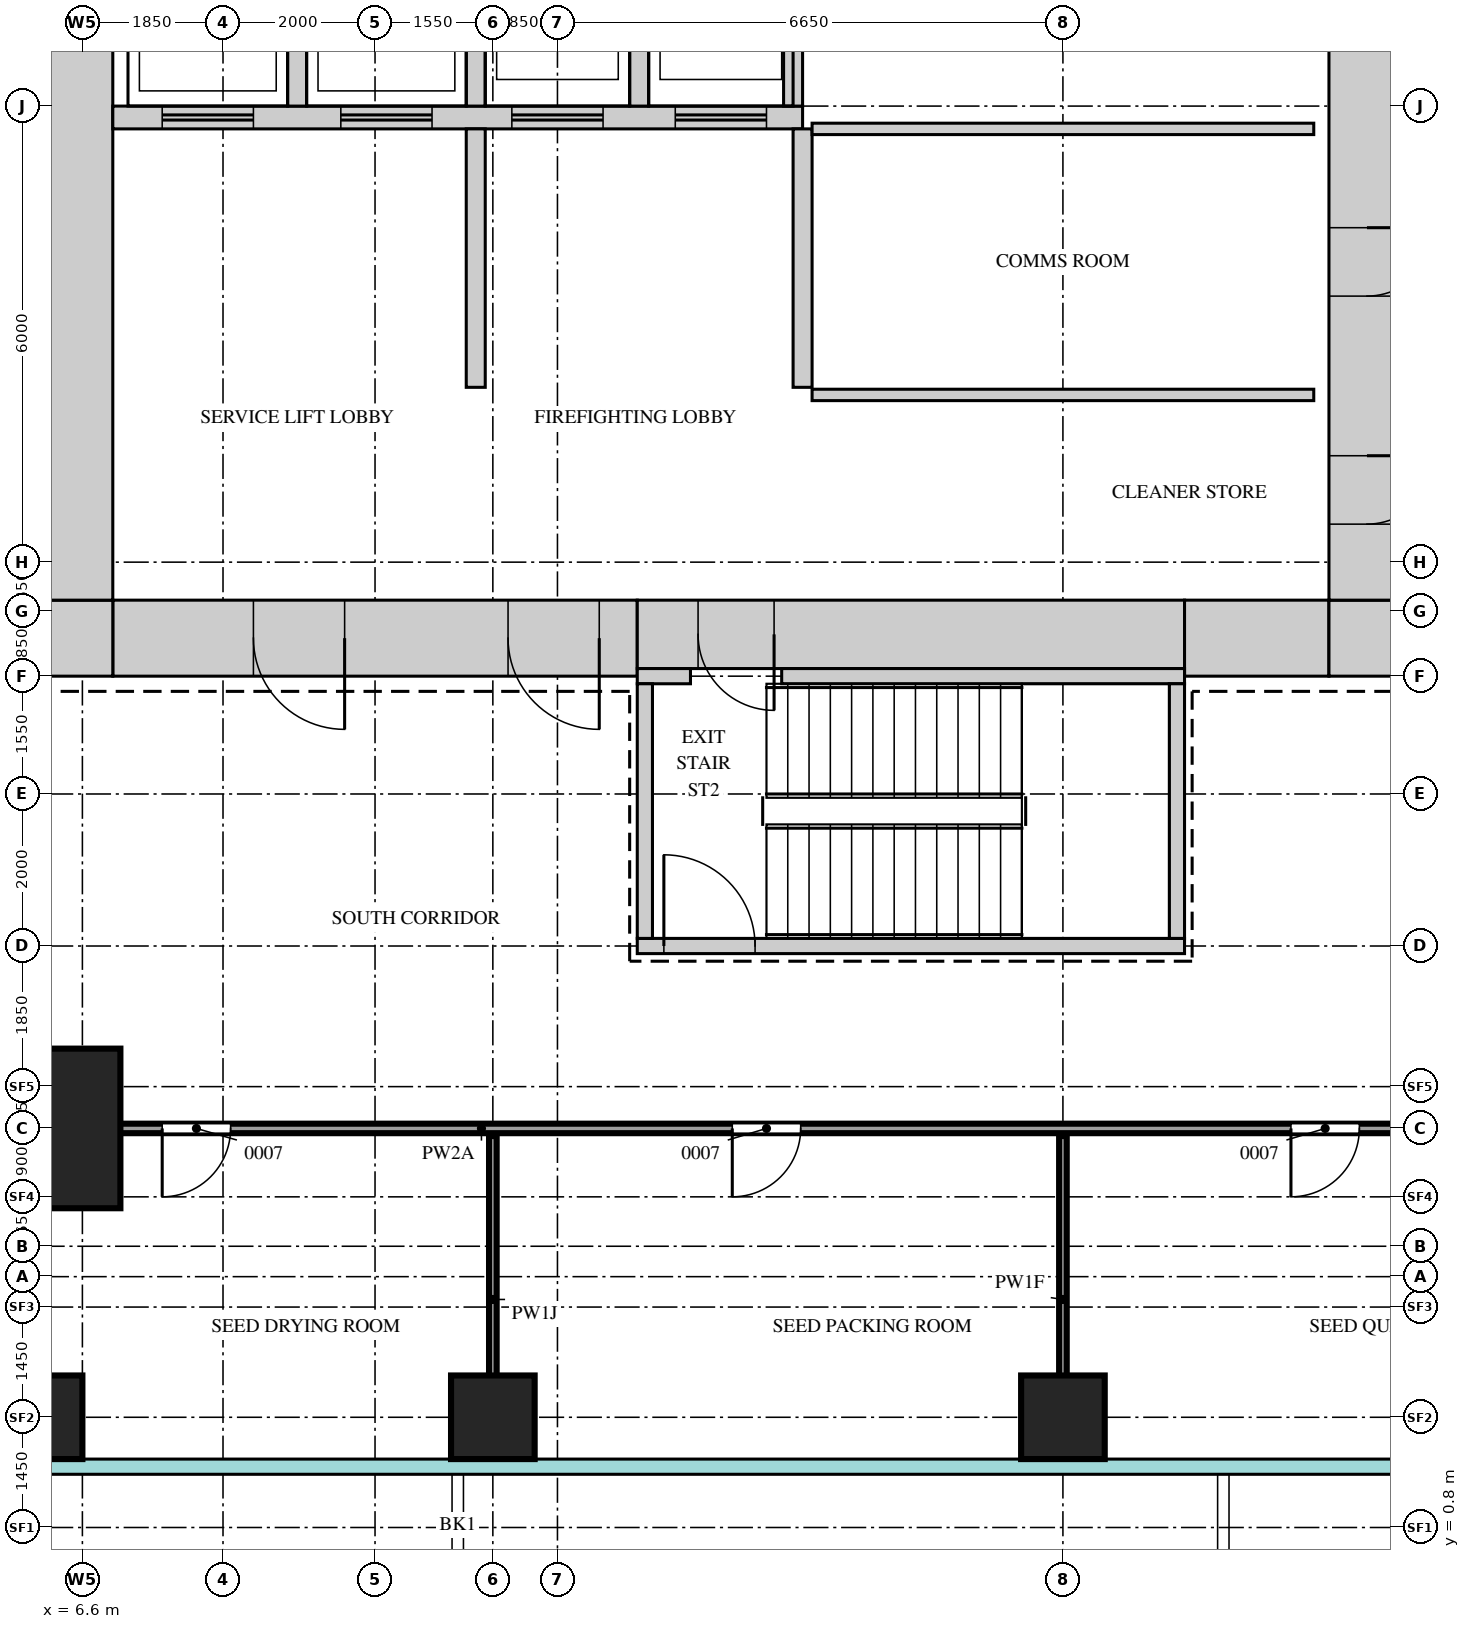
"""IFC4 building model, lengths in metres.
Left out: names, types, materials, properties, quantities, classifications, styles, units other than length and angle.
Written with IfcOpenShell. Run it as: python <this file> out.ifc"""

import sys

from ifc_helpers import new_model, si_unit, direction, frame, frame_2d, origin, origin_2d, place, context, subcontext, project, spatial, rectangle, extrude, source, transform, mapped, element, fill, save


model = new_model("IFC4")
c1 = context("Model", 3, precision=1e-05, world=origin(), true_north=direction((0.0, 1.0)))
c2 = subcontext(c1, "Body", "Model", "MODEL_VIEW")
j1 = project(units=[si_unit("LENGTHUNIT", "METRE"), si_unit("PLANEANGLEUNIT", "RADIAN")], contexts=[c1])
p1 = place(None, origin())
s1 = spatial("IfcSite", under=j1, at=p1, CompositionType="ELEMENT")
p2 = place(p1, origin())
s2 = spatial("IfcBuilding", under=s1, at=p2, CompositionType="ELEMENT")
p3 = place(p2, frame((0.0, 0.0, 110.3)))
s3 = spatial("IfcBuildingStorey", under=s2, at=p3, CompositionType="ELEMENT", Elevation=110.3)
m1 = source(origin(), c2, "Body", "SweptSolid", [
    extrude(rectangle(XDim=6.9, YDim=1.0, at=frame_2d((3.45, 0.0))), origin(), (0.0, 0.0, 1.0), 4.1),
])
p4 = place(p3, frame((7.0, 12.5, 0.0), z_axis=(0.0, 0.0, 1.0), x_axis=(1.0, 0.0, 0.0)))
e1 = element("IfcWall", 1, at=p4, inside=s3, PredefinedType="SHEAR", context=c2, shape_type="MappedRepresentation", body=[
    mapped(m1, transform((0.0, 0.0, 0.0))),
])
m2 = source(origin(), c2, "Body", "SweptSolid", [
    extrude(rectangle(XDim=1.2, YDim=2.1, at=frame_2d((0.6, 1.05))), frame((0.0, 0.51, 0.0), z_axis=(0.0, -1.0, 0.0), x_axis=(1.0, 0.0, 0.0)), (0.0, 0.0, 1.0), 1.02),
])
p5 = place(p4, frame((5.2, 0.0, 0.0)))
e2 = element("IfcOpeningElement", 2, at=p5, cuts=e1, PredefinedType="OPENING", context=c2, shape_type="MappedRepresentation", body=[
    mapped(m2, transform((0.0, 0.0, 0.0))),
])
p6 = place(p4, frame((1.85, 0.0, 0.0)))
e3 = element("IfcOpeningElement", 3, at=p6, cuts=e1, PredefinedType="OPENING", context=c2, shape_type="MappedRepresentation", body=[
    mapped(m2, transform((0.0, 0.0, 0.0))),
])
m3 = source(origin(), c2, "Body", "SweptSolid", [
    extrude(rectangle(XDim=7.2, YDim=0.9, at=frame_2d((3.6, 0.0))), origin(), (0.0, 0.0, 1.0), 4.1),
])
p7 = place(p3, frame((13.9, 12.55, 0.0), z_axis=(0.0, 0.0, 1.0), x_axis=(1.0, 0.0, 0.0)))
e4 = element("IfcWall", 4, at=p7, inside=s3, PredefinedType="SHEAR", context=c2, shape_type="MappedRepresentation", body=[
    mapped(m3, transform((0.0, 0.0, 0.0))),
])
m4 = source(origin(), c2, "Body", "SweptSolid", [
    extrude(rectangle(XDim=1.0, YDim=2.1, at=frame_2d((0.5, 1.05))), frame((0.0, 0.46, 0.0), z_axis=(0.0, -1.0, 0.0), x_axis=(1.0, 0.0, 0.0)), (0.0, 0.0, 1.0), 0.92),
])
p8 = place(p7, frame((0.8, 0.0, 0.0)))
e5 = element("IfcOpeningElement", 5, at=p8, cuts=e4, PredefinedType="OPENING", context=c2, shape_type="MappedRepresentation", body=[
    mapped(m4, transform((0.0, 0.0, 0.0))),
])
m5 = source(origin(), c2, "Body", "SweptSolid", [
    extrude(rectangle(XDim=1.9, YDim=1.0, at=frame_2d((0.95, 0.0))), origin(), (0.0, 0.0, 1.0), 4.1),
])
p9 = place(p3, frame((21.1, 12.5, 0.0), z_axis=(0.0, 0.0, 1.0), x_axis=(1.0, 0.0, 0.0)))
e6 = element("IfcWall", 6, at=p9, inside=s3, PredefinedType="SHEAR", context=c2, shape_type="MappedRepresentation", body=[
    mapped(m5, transform((0.0, 0.0, 0.0))),
])
m6 = source(origin(), c2, "Body", "SweptSolid", [
    extrude(rectangle(XDim=1.0, YDim=1.0, at=frame_2d((0.5, 0.0))), origin(), (0.0, 0.0, 1.0), 4.1),
])
for number, where, z_axis, x_axis in (
    (7, (23.0, 12.5, 0.0), (0.0, 0.0, 1.0), (1.0, 0.0, 0.0)),
    (8, (6.0, 12.5, 0.0), (0.0, 0.0, 1.0), (1.0, 0.0, 0.0)),
):
    element("IfcWall", number, at=place(p3, frame(where, z_axis=z_axis, x_axis=x_axis)), inside=s3, PredefinedType="SHEAR", context=c2, shape_type="MappedRepresentation", body=[
        mapped(m6, transform((0.0, 0.0, 0.0))),
    ])
m7 = source(origin(), c2, "Body", "SweptSolid", [
    extrude(rectangle(XDim=28.0, YDim=1.0, at=frame_2d((14.0, 0.0))), origin(), (0.0, 0.0, 1.0), 4.1),
])
p10 = place(p3, frame((23.5, 13.0, 0.0), z_axis=(0.0, 0.0, 1.0), x_axis=(0.0, 1.0, 0.0)))
e9 = element("IfcWall", 9, at=p10, inside=s3, PredefinedType="SHEAR", context=c2, shape_type="MappedRepresentation", body=[
    mapped(m7, transform((0.0, 0.0, 0.0))),
])
m8 = source(origin(), c2, "Body", "SweptSolid", [
    extrude(rectangle(XDim=1.8, YDim=2.1, at=frame_2d((0.9, 1.05))), frame((0.0, 0.51, 0.0), z_axis=(0.0, -1.0, 0.0), x_axis=(1.0, 0.0, 0.0)), (0.0, 0.0, 1.0), 1.02),
])
p11 = place(p10, frame((22.6, 0.0, 0.0)))
e10 = element("IfcOpeningElement", 10, at=p11, cuts=e9, PredefinedType="OPENING", context=c2, shape_type="MappedRepresentation", body=[
    mapped(m8, transform((0.0, 0.0, 0.0))),
])
p12 = place(p10, frame((13.85, 0.0, 0.0)))
e11 = element("IfcOpeningElement", 11, at=p12, cuts=e9, PredefinedType="OPENING", context=c2, shape_type="MappedRepresentation", body=[
    mapped(m2, transform((0.0, 0.0, 0.0))),
])
m9 = source(origin(), c2, "Body", "SweptSolid", [
    extrude(rectangle(XDim=0.9, YDim=2.1, at=frame_2d((0.45, 1.05))), frame((0.0, 0.51, 0.0), z_axis=(0.0, -1.0, 0.0), x_axis=(1.0, 0.0, 0.0)), (0.0, 0.0, 1.0), 1.02),
])
p13 = place(p10, frame((1.0, 0.0, 0.0)))
e12 = element("IfcOpeningElement", 12, at=p13, cuts=e9, PredefinedType="OPENING", context=c2, shape_type="MappedRepresentation", body=[
    mapped(m9, transform((0.0, 0.0, 0.0))),
])
p14 = place(p10, frame((4.0, 0.0, 0.0)))
e13 = element("IfcOpeningElement", 13, at=p14, cuts=e9, PredefinedType="OPENING", context=c2, shape_type="MappedRepresentation", body=[
    mapped(m9, transform((0.0, 0.0, 0.0))),
])
p15 = place(p10, frame((7.6, 0.0, 0.0)))
e14 = element("IfcOpeningElement", 14, at=p15, cuts=e9, PredefinedType="OPENING", context=c2, shape_type="MappedRepresentation", body=[
    mapped(m9, transform((0.0, 0.0, 0.0))),
])
p16 = place(p3, frame((6.5, 13.0, 0.0), z_axis=(0.0, 0.0, 1.0), x_axis=(0.0, 1.0, 0.0)))
e15 = element("IfcWall", 15, at=p16, inside=s3, PredefinedType="SHEAR", context=c2, shape_type="MappedRepresentation", body=[
    mapped(m7, transform((0.0, 0.0, 0.0))),
])
m10 = source(origin(), c2, "Body", "SweptSolid", [
    extrude(rectangle(XDim=0.7, YDim=0.2, at=frame_2d((0.35, 0.0))), origin(), (0.0, 0.0, 1.0), 4.1),
])
p17 = place(p3, frame((13.9, 12.0, 0.0), z_axis=(0.0, 0.0, 1.0), x_axis=(1.0, 0.0, 0.0)))
e16 = element("IfcWall", 16, at=p17, inside=s3, PredefinedType="SHEAR", context=c2, shape_type="MappedRepresentation", body=[
    mapped(m10, transform((0.0, 0.0, 0.0))),
])
m11 = source(origin(), c2, "Body", "SweptSolid", [
    extrude(rectangle(XDim=5.3, YDim=0.2, at=frame_2d((2.65, 0.0))), origin(), (0.0, 0.0, 1.0), 4.1),
])
p18 = place(p3, frame((15.8, 12.0, 0.0), z_axis=(0.0, 0.0, 1.0), x_axis=(1.0, 0.0, 0.0)))
e17 = element("IfcWall", 17, at=p18, inside=s3, PredefinedType="SHEAR", context=c2, shape_type="MappedRepresentation", body=[
    mapped(m11, transform((0.0, 0.0, 0.0))),
])
m12 = source(origin(), c2, "Body", "SweptSolid", [
    extrude(rectangle(XDim=7.2, YDim=0.2, at=frame_2d((3.6, 0.0))), origin(), (0.0, 0.0, 1.0), 4.1),
])
p19 = place(p3, frame((13.9, 8.45, 0.0), z_axis=(0.0, 0.0, 1.0), x_axis=(1.0, 0.0, 0.0)))
e18 = element("IfcWall", 18, at=p19, inside=s3, PredefinedType="SHEAR", context=c2, shape_type="MappedRepresentation", body=[
    mapped(m12, transform((0.0, 0.0, 0.0))),
])
m13 = source(origin(), c2, "Body", "SweptSolid", [
    extrude(rectangle(XDim=1.2, YDim=2.1, at=frame_2d((0.6, 1.05))), frame((0.0, 0.11, 0.0), z_axis=(0.0, -1.0, 0.0), x_axis=(1.0, 0.0, 0.0)), (0.0, 0.0, 1.0), 0.22),
])
p20 = place(p19, frame((0.35, 0.0, 0.0)))
e19 = element("IfcOpeningElement", 19, at=p20, cuts=e18, PredefinedType="OPENING", context=c2, shape_type="MappedRepresentation", body=[
    mapped(m13, transform((0.0, 0.0, 0.0))),
])
m14 = source(origin(), c2, "Body", "SweptSolid", [
    extrude(rectangle(XDim=3.35, YDim=0.2, at=frame_2d((1.675, 0.0))), origin(), (0.0, 0.0, 1.0), 4.1),
])
for number, where, z_axis, x_axis in (
    (20, (21.0, 8.55, 0.0), (0.0, 0.0, 1.0), (0.0, 1.0, 0.0)),
    (21, (14.0, 8.55, 0.0), (0.0, 0.0, 1.0), (0.0, 1.0, 0.0)),
):
    element("IfcWall", number, at=place(p3, frame(where, z_axis=z_axis, x_axis=x_axis)), inside=s3, PredefinedType="SHEAR", context=c2, shape_type="MappedRepresentation", body=[
        mapped(m14, transform((0.0, 0.0, 0.0))),
    ])
m15 = source(origin(), c2, "Body", "SweptSolid", [
    extrude(rectangle(XDim=9.075, YDim=0.3, at=frame_2d((4.538, 0.0))), origin(), (0.0, 0.0, 1.0), 4.1),
])
p21 = place(p3, frame((7.0, 19.35, 0.0), z_axis=(0.0, 0.0, 1.0), x_axis=(1.0, 0.0, 0.0)))
e22 = element("IfcWall", 22, at=p21, inside=s3, PredefinedType="STANDARD", context=c2, shape_type="MappedRepresentation", body=[
    mapped(m15, transform((0.0, 0.0, 0.0))),
])
m16 = source(origin(), c2, "Body", "SweptSolid", [
    extrude(rectangle(XDim=1.2, YDim=2.1, at=frame_2d((0.6, 1.05))), frame((0.0, 0.16, 0.0), z_axis=(0.0, -1.0, 0.0), x_axis=(1.0, 0.0, 0.0)), (0.0, 0.0, 1.0), 0.32),
])
p22 = place(p21, frame((0.65, 0.0, 0.0)))
e23 = element("IfcOpeningElement", 23, at=p22, cuts=e22, PredefinedType="OPENING", context=c2, shape_type="MappedRepresentation", body=[
    mapped(m16, transform((0.0, 0.0, 0.0))),
])
p23 = place(p21, frame((3.0, 0.0, 0.0)))
e24 = element("IfcOpeningElement", 24, at=p23, cuts=e22, PredefinedType="OPENING", context=c2, shape_type="MappedRepresentation", body=[
    mapped(m16, transform((0.0, 0.0, 0.0))),
])
p24 = place(p21, frame((5.25, 0.0, 0.0)))
e25 = element("IfcOpeningElement", 25, at=p24, cuts=e22, PredefinedType="OPENING", context=c2, shape_type="MappedRepresentation", body=[
    mapped(m16, transform((0.0, 0.0, 0.0))),
])
p25 = place(p21, frame((7.4, 0.0, 0.0)))
e26 = element("IfcOpeningElement", 26, at=p25, cuts=e22, PredefinedType="OPENING", context=c2, shape_type="MappedRepresentation", body=[
    mapped(m16, transform((0.0, 0.0, 0.0))),
])
m17 = source(origin(), c2, "Body", "SweptSolid", [
    extrude(rectangle(XDim=3.1, YDim=0.25, at=frame_2d((1.55, 0.0))), origin(), (0.0, 0.0, 1.0), 4.1),
])
for number, where, z_axis, x_axis in (
    (27, (9.425, 19.5, 0.0), (0.0, 0.0, 1.0), (0.0, 1.0, 0.0)),
    (28, (11.775, 19.5, 0.0), (0.0, 0.0, 1.0), (0.0, 1.0, 0.0)),
    (29, (13.925, 19.5, 0.0), (0.0, 0.0, 1.0), (0.0, 1.0, 0.0)),
    (30, (15.95, 19.5, 0.0), (0.0, 0.0, 1.0), (0.0, 1.0, 0.0)),
):
    element("IfcWall", number, at=place(p3, frame(where, z_axis=z_axis, x_axis=x_axis)), inside=s3, PredefinedType="STANDARD", context=c2, shape_type="MappedRepresentation", body=[
        mapped(m17, transform((0.0, 0.0, 0.0))),
    ])
m18 = source(origin(), c2, "Body", "SweptSolid", [
    extrude(rectangle(XDim=3.4, YDim=0.25, at=frame_2d((1.7, 0.0))), origin(), (0.0, 0.0, 1.0), 4.1),
])
for number, where, z_axis, x_axis in (
    (31, (16.075, 15.8, 0.0), (0.0, 0.0, 1.0), (0.0, 1.0, 0.0)),
    (32, (11.775, 15.8, 0.0), (0.0, 0.0, 1.0), (0.0, 1.0, 0.0)),
):
    element("IfcWall", number, at=place(p3, frame(where, z_axis=z_axis, x_axis=x_axis)), inside=s3, PredefinedType="STANDARD", context=c2, shape_type="MappedRepresentation", body=[
        mapped(m18, transform((0.0, 0.0, 0.0))),
    ])
m19 = source(origin(), c2, "Body", "SweptSolid", [
    extrude(rectangle(XDim=2.1, YDim=2.1, at=origin_2d()), origin(), (0.0, 0.0, 1.0), 4.4),
])
p26 = place(p3, frame((6.05, 6.05, 0.0), z_axis=(0.0, 0.0, 1.0), x_axis=(1.0, 0.0, 0.0)))
e33 = element("IfcColumn", 33, at=p26, inside=s3, PredefinedType="COLUMN", context=c2, shape_type="MappedRepresentation", body=[
    mapped(m19, transform((0.0, 0.0, 0.0))),
])
m20 = source(origin(), c2, "Body", "SweptSolid", [
    extrude(rectangle(XDim=1.1, YDim=1.1, at=origin_2d()), origin(), (0.0, 0.0, 1.0), 4.1),
])
for number, where, z_axis, x_axis in (
    (34, (6.05, 2.25, 0.0), (0.0, 0.0, 1.0), (1.0, 0.0, 0.0)),
    (35, (12.0, 2.25, 0.0), (0.0, 0.0, 1.0), (1.0, 0.0, 0.0)),
    (36, (19.5, 2.25, 0.0), (0.0, 0.0, 1.0), (1.0, 0.0, 0.0)),
):
    element("IfcColumn", number, at=place(p3, frame(where, z_axis=z_axis, x_axis=x_axis)), inside=s3, PredefinedType="COLUMN", context=c2, shape_type="MappedRepresentation", body=[
        mapped(m20, transform((0.0, 0.0, 0.0))),
    ])
m21 = source(origin(), c2, "Body", "SweptSolid", [
    extrude(rectangle(XDim=4.3, YDim=0.1, at=frame_2d((2.15, 0.0))), origin(), (0.0, 0.0, 1.0), 3.65),
])
p27 = place(p3, frame((12.0, 1.65, 0.0), z_axis=(0.0, 0.0, 1.0), x_axis=(0.0, 1.0, 0.0)))
e37 = element("IfcWall", 37, at=p27, inside=s3, PredefinedType="PARTITIONING", context=c2, shape_type="MappedRepresentation", body=[
    mapped(m21, transform((0.0, 0.0, 0.0))),
])
m22 = source(origin(), c2, "Body", "SweptSolid", [
    extrude(rectangle(XDim=4.3, YDim=0.1, at=frame_2d((2.15, 0.0))), origin(), (0.0, 0.0, 1.0), 3.77),
])
p28 = place(p3, frame((19.5, 1.65, 0.0), z_axis=(0.0, 0.0, 1.0), x_axis=(0.0, 1.0, 0.0)))
e38 = element("IfcWall", 38, at=p28, inside=s3, PredefinedType="PARTITIONING", context=c2, shape_type="MappedRepresentation", body=[
    mapped(m22, transform((0.0, 0.0, 0.0))),
])
m23 = source(origin(), c2, "Body", "SweptSolid", [
    extrude(rectangle(XDim=22.3, YDim=0.125, at=frame_2d((11.15, 0.0))), origin(), (0.0, 0.0, 1.0), 3.55),
])
p29 = place(p3, frame((4.15, 6.05, 0.0), z_axis=(0.0, 0.0, 1.0), x_axis=(1.0, 0.0, 0.0)))
e39 = element("IfcWall", 39, at=p29, inside=s3, PredefinedType="PARTITIONING", context=c2, shape_type="MappedRepresentation", body=[
    mapped(m23, transform((0.0, 0.0, 0.0))),
])
m24 = source(origin(), c2, "Body", "SweptSolid", [
    extrude(rectangle(XDim=0.9, YDim=2.1, at=frame_2d((0.45, 1.05))), frame((0.0, 0.073, 0.0), z_axis=(0.0, -1.0, 0.0), x_axis=(1.0, 0.0, 0.0)), (0.0, 0.0, 1.0), 0.145),
])
p30 = place(p29, frame((3.5, 0.0, 0.0)))
e40 = element("IfcOpeningElement", 40, at=p30, cuts=e39, PredefinedType="OPENING", context=c2, shape_type="MappedRepresentation", body=[
    mapped(m24, transform((0.0, 0.0, 0.0))),
])
p31 = place(p29, frame((11.0, 0.0, 0.0)))
e41 = element("IfcOpeningElement", 41, at=p31, cuts=e39, PredefinedType="OPENING", context=c2, shape_type="MappedRepresentation", body=[
    mapped(m24, transform((0.0, 0.0, 0.0))),
])
p32 = place(p29, frame((18.35, 0.0, 0.0)))
e42 = element("IfcOpeningElement", 42, at=p32, cuts=e39, PredefinedType="OPENING", context=c2, shape_type="MappedRepresentation", body=[
    mapped(m24, transform((0.0, 0.0, 0.0))),
])
m25 = source(origin(), c2, "Body", "SweptSolid", [
    extrude(rectangle(XDim=6.6, YDim=0.15, at=frame_2d((3.3, 0.0))), origin(), (0.0, 0.0, 1.0), 4.2),
])
for number, where, z_axis, x_axis in (
    (43, (16.2, 15.7, 0.0), (0.0, 0.0, 1.0), (1.0, 0.0, 0.0)),
    (44, (16.2, 19.2, 0.0), (0.0, 0.0, 1.0), (1.0, 0.0, 0.0)),
):
    element("IfcWall", number, at=place(p3, frame(where, z_axis=z_axis, x_axis=x_axis)), inside=s3, PredefinedType="PARTITIONING", context=c2, shape_type="MappedRepresentation", body=[
        mapped(m25, transform((0.0, 0.0, 0.0))),
    ])
m26 = source(origin(), c2, "Body", "SweptSolid", [
    extrude(rectangle(XDim=0.9, YDim=2.1, at=frame_2d((0.45, 1.05))), frame((0.0, 0.45, 0.0), z_axis=(0.0, -1.0, 0.0), x_axis=(1.0, 0.0, 0.0)), (0.0, 0.0, 1.0), 0.9),
])
p33 = place(p13, origin())
e45 = element("IfcDoor", 45, at=p33, inside=s3, OperationType="SINGLE_SWING_RIGHT", PredefinedType="DOOR", context=c2, shape_type="MappedRepresentation", body=[
    mapped(m26, transform((0.0, 0.0, 0.0))),
])
fill(e12, e45)
p34 = place(p14, origin())
e46 = element("IfcDoor", 46, at=p34, inside=s3, OperationType="SINGLE_SWING_RIGHT", PredefinedType="DOOR", context=c2, shape_type="MappedRepresentation", body=[
    mapped(m26, transform((0.0, 0.0, 0.0))),
])
fill(e13, e46)
m27 = source(origin(), c2, "Body", "SweptSolid", [
    extrude(rectangle(XDim=1.2, YDim=2.1, at=frame_2d((0.6, 1.05))), frame((0.0, 0.45, 0.0), z_axis=(0.0, -1.0, 0.0), x_axis=(1.0, 0.0, 0.0)), (0.0, 0.0, 1.0), 0.9),
])
p35 = place(p5, origin())
e47 = element("IfcDoor", 47, at=p35, inside=s3, OperationType="SINGLE_SWING_RIGHT", PredefinedType="DOOR", context=c2, shape_type="MappedRepresentation", body=[
    mapped(m27, transform((0.0, 0.0, 0.0))),
])
fill(e2, e47)
p36 = place(p6, origin())
e48 = element("IfcDoor", 48, at=p36, inside=s3, OperationType="SINGLE_SWING_RIGHT", PredefinedType="DOOR", context=c2, shape_type="MappedRepresentation", body=[
    mapped(m27, transform((0.0, 0.0, 0.0))),
])
fill(e3, e48)
m28 = source(origin(), c2, "Body", "SweptSolid", [
    extrude(rectangle(XDim=1.0, YDim=2.1, at=frame_2d((0.5, 1.05))), frame((0.0, 0.4, 0.0), z_axis=(0.0, -1.0, 0.0), x_axis=(1.0, 0.0, 0.0)), (0.0, 0.0, 1.0), 0.8),
])
p37 = place(p8, origin())
e49 = element("IfcDoor", 49, at=p37, inside=s3, OperationType="SINGLE_SWING_RIGHT", PredefinedType="DOOR", context=c2, shape_type="MappedRepresentation", body=[
    mapped(m28, transform((0.0, 0.0, 0.0))),
])
fill(e5, e49)
m29 = source(origin(), c2, "Body", "SweptSolid", [
    extrude(rectangle(XDim=0.9, YDim=2.1, at=frame_2d((0.45, 1.05))), frame((0.0, 0.025, 0.0), z_axis=(0.0, -1.0, 0.0), x_axis=(1.0, 0.0, 0.0)), (0.0, 0.0, 1.0), 0.05),
])
p38 = place(p30, origin())
e50 = element("IfcDoor", 50, at=p38, inside=s3, OperationType="SINGLE_SWING_LEFT", PredefinedType="DOOR", context=c2, shape_type="MappedRepresentation", body=[
    mapped(m29, transform((0.0, 0.0, 0.0))),
])
fill(e40, e50)
p39 = place(p31, origin())
e51 = element("IfcDoor", 51, at=p39, inside=s3, OperationType="SINGLE_SWING_LEFT", PredefinedType="DOOR", context=c2, shape_type="MappedRepresentation", body=[
    mapped(m29, transform((0.0, 0.0, 0.0))),
])
fill(e41, e51)
p40 = place(p32, origin())
e52 = element("IfcDoor", 52, at=p40, inside=s3, OperationType="SINGLE_SWING_LEFT", PredefinedType="DOOR", context=c2, shape_type="MappedRepresentation", body=[
    mapped(m29, transform((0.0, 0.0, 0.0))),
])
fill(e42, e52)
m30 = source(origin(), c2, "Body", "SweptSolid", [
    extrude(rectangle(XDim=1.2, YDim=2.1, at=frame_2d((0.6, 1.05))), frame((0.0, 0.025, 0.0), z_axis=(0.0, -1.0, 0.0), x_axis=(1.0, 0.0, 0.0)), (0.0, 0.0, 1.0), 0.05),
])
p41 = place(p20, origin())
e53 = element("IfcDoor", 53, at=p41, inside=s3, OperationType="SINGLE_SWING_RIGHT", PredefinedType="DOOR", context=c2, shape_type="MappedRepresentation", body=[
    mapped(m30, transform((0.0, 0.0, 0.0))),
])
fill(e19, e53)
p42 = place(p22, origin())
e54 = element("IfcDoor", 54, at=p42, inside=s3, OperationType="DOUBLE_DOOR_SLIDING", PredefinedType="DOOR", context=c2, shape_type="MappedRepresentation", body=[
    mapped(m30, transform((0.0, 0.0, 0.0))),
])
fill(e23, e54)
p43 = place(p23, origin())
e55 = element("IfcDoor", 55, at=p43, inside=s3, OperationType="DOUBLE_DOOR_SLIDING", PredefinedType="DOOR", context=c2, shape_type="MappedRepresentation", body=[
    mapped(m30, transform((0.0, 0.0, 0.0))),
])
fill(e24, e55)
p44 = place(p24, origin())
e56 = element("IfcDoor", 56, at=p44, inside=s3, OperationType="DOUBLE_DOOR_SLIDING", PredefinedType="DOOR", context=c2, shape_type="MappedRepresentation", body=[
    mapped(m30, transform((0.0, 0.0, 0.0))),
])
fill(e25, e56)
p45 = place(p25, origin())
e57 = element("IfcDoor", 57, at=p45, inside=s3, OperationType="DOUBLE_DOOR_SLIDING", PredefinedType="DOOR", context=c2, shape_type="MappedRepresentation", body=[
    mapped(m30, transform((0.0, 0.0, 0.0))),
])
fill(e26, e57)
save(model, sys.argv[1])
